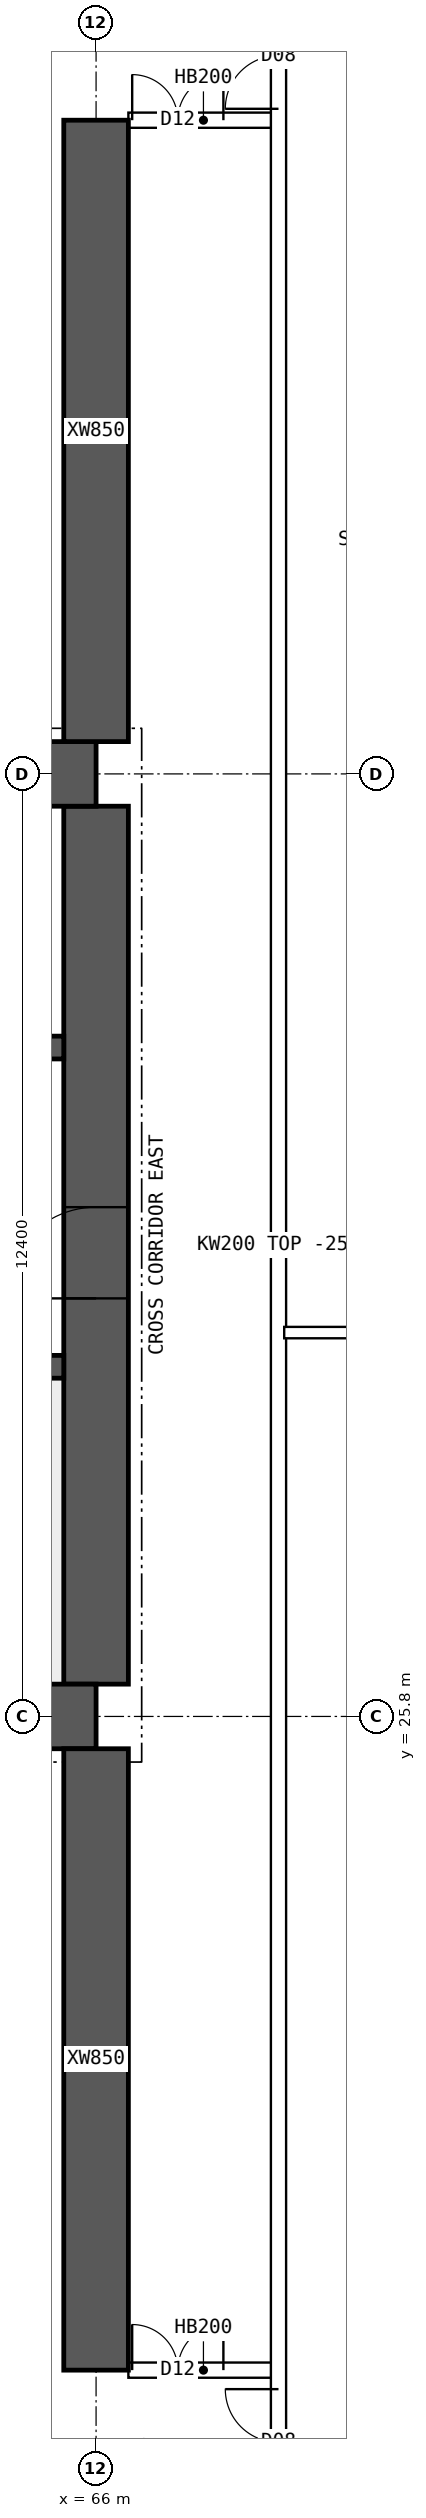
"""IFC4 building model, lengths in metres.
Left out: names, types, materials, properties, quantities, classifications, styles, units other than length and angle.
Written with IfcOpenShell. Run it as: python <this file> out.ifc"""

import sys

from ifc_helpers import new_model, si_unit, direction, frame, frame_2d, origin, place, context, subcontext, project, spatial, polyline, rectangle, outline, extrude, element, fill, save


model = new_model("IFC4")
c1 = context("Model", 3, precision=1e-05, world=origin(), true_north=direction((0.0, 1.0)))
c2 = subcontext(c1, "Body", "Model", "MODEL_VIEW")
j1 = project(units=[si_unit("LENGTHUNIT", "METRE"), si_unit("PLANEANGLEUNIT", "RADIAN")], contexts=[c1])
p1 = place(None, origin())
s1 = spatial("IfcSite", under=j1, at=p1, CompositionType="ELEMENT")
p2 = place(p1, origin())
s2 = spatial("IfcBuilding", under=s1, at=p2, CompositionType="ELEMENT")
p3 = place(p2, frame((0.0, 0.0, 182.35)))
s3 = spatial("IfcBuildingStorey", under=s2, at=p3, CompositionType="ELEMENT", Elevation=182.35)
for number, where, z_axis, x_axis in (
    (1, (18.0, 25.8, 0.0), (0.0, 0.0, 1.0), (1.0, 0.0, 0.0)),
    (2, (18.0, 38.2, 0.0), (0.0, 0.0, 1.0), (1.0, 0.0, 0.0)),
):
    element("IfcWall", number, at=place(p3, frame(where, z_axis=z_axis, x_axis=x_axis)), inside=s3, PredefinedType="SHEAR", context=c2, shape_type="SweptSolid", body=[
        extrude(rectangle(XDim=48.0, YDim=0.85, at=frame_2d((24.0, 0.0))), origin(), (0.0, 0.0, 1.0), 3.75),
    ])
p4 = place(p3, frame((66.0, 26.225, 0.0), z_axis=(0.0, 0.0, 1.0), x_axis=(0.0, 1.0, 0.0)))
e3 = element("IfcWall", 3, at=p4, inside=s3, PredefinedType="SHEAR", context=c2, shape_type="SweptSolid", body=[
    extrude(rectangle(XDim=11.55, YDim=0.85, at=frame_2d((5.775, 0.0))), origin(), (0.0, 0.0, 1.0), 3.75),
])
p5 = place(p4, frame((5.075, 0.0, 0.0)))
e4 = element("IfcOpeningElement", 4, at=p5, cuts=e3, PredefinedType="OPENING", context=c2, shape_type="SweptSolid", body=[
    extrude(rectangle(XDim=1.2, YDim=2.1, at=frame_2d((0.6, 1.05))), frame((0.0, 0.435, 0.0), z_axis=(0.0, -1.0, 0.0), x_axis=(1.0, 0.0, 0.0)), (0.0, 0.0, 1.0), 0.87),
])
p6 = place(p3, frame((18.425, 30.4, 0.0), z_axis=(0.0, 0.0, 1.0), x_axis=(1.0, 0.0, 0.0)))
e5 = element("IfcWall", 5, at=p6, inside=s3, PredefinedType="SHEAR", context=c2, shape_type="SweptSolid", body=[
    extrude(rectangle(XDim=47.15, YDim=0.3, at=frame_2d((23.575, 0.0))), origin(), (0.0, 0.0, 1.0), 3.75),
])
p7 = place(p6, frame((0.4, 0.0, 0.0)))
e6 = element("IfcOpeningElement", 6, at=p7, cuts=e5, PredefinedType="OPENING", context=c2, shape_type="SweptSolid", body=[
    extrude(rectangle(XDim=1.0, YDim=2.1, at=frame_2d((0.5, 1.05))), frame((0.0, 0.16, 0.0), z_axis=(0.0, -1.0, 0.0), x_axis=(1.0, 0.0, 0.0)), (0.0, 0.0, 1.0), 0.32),
])
p8 = place(p6, frame((45.75, 0.0, 0.0)))
e7 = element("IfcOpeningElement", 7, at=p8, cuts=e5, PredefinedType="OPENING", context=c2, shape_type="SweptSolid", body=[
    extrude(rectangle(XDim=1.0, YDim=2.1, at=frame_2d((0.5, 1.05))), frame((0.0, 0.16, 0.0), z_axis=(0.0, -1.0, 0.0), x_axis=(1.0, 0.0, 0.0)), (0.0, 0.0, 1.0), 0.32),
])
p9 = place(p6, frame((8.325, 0.0, 0.0)))
e8 = element("IfcOpeningElement", 8, at=p9, cuts=e5, PredefinedType="OPENING", context=c2, shape_type="SweptSolid", body=[
    extrude(rectangle(XDim=1.1, YDim=2.1, at=frame_2d((0.55, 1.05))), frame((0.0, 0.16, 0.0), z_axis=(0.0, -1.0, 0.0), x_axis=(1.0, 0.0, 0.0)), (0.0, 0.0, 1.0), 0.32),
])
p10 = place(p6, frame((10.925, 0.0, 0.0)))
e9 = element("IfcOpeningElement", 9, at=p10, cuts=e5, PredefinedType="OPENING", context=c2, shape_type="SweptSolid", body=[
    extrude(rectangle(XDim=1.1, YDim=2.1, at=frame_2d((0.55, 1.05))), frame((0.0, 0.16, 0.0), z_axis=(0.0, -1.0, 0.0), x_axis=(1.0, 0.0, 0.0)), (0.0, 0.0, 1.0), 0.32),
])
p11 = place(p6, frame((13.525, 0.0, 0.0)))
e10 = element("IfcOpeningElement", 10, at=p11, cuts=e5, PredefinedType="OPENING", context=c2, shape_type="SweptSolid", body=[
    extrude(rectangle(XDim=1.1, YDim=2.1, at=frame_2d((0.55, 1.05))), frame((0.0, 0.16, 0.0), z_axis=(0.0, -1.0, 0.0), x_axis=(1.0, 0.0, 0.0)), (0.0, 0.0, 1.0), 0.32),
])
p12 = place(p6, frame((16.125, 0.0, 0.0)))
e11 = element("IfcOpeningElement", 11, at=p12, cuts=e5, PredefinedType="OPENING", context=c2, shape_type="SweptSolid", body=[
    extrude(rectangle(XDim=1.1, YDim=2.1, at=frame_2d((0.55, 1.05))), frame((0.0, 0.16, 0.0), z_axis=(0.0, -1.0, 0.0), x_axis=(1.0, 0.0, 0.0)), (0.0, 0.0, 1.0), 0.32),
])
p13 = place(p6, frame((18.9, 0.0, 0.0)))
e12 = element("IfcOpeningElement", 12, at=p13, cuts=e5, PredefinedType="OPENING", context=c2, shape_type="SweptSolid", body=[
    extrude(rectangle(XDim=0.9, YDim=2.1, at=frame_2d((0.45, 1.05))), frame((0.0, 0.16, 0.0), z_axis=(0.0, -1.0, 0.0), x_axis=(1.0, 0.0, 0.0)), (0.0, 0.0, 1.0), 0.32),
])
p14 = place(p6, frame((30.192, 0.0, 0.0)))
e13 = element("IfcOpeningElement", 13, at=p14, cuts=e5, PredefinedType="OPENING", context=c2, shape_type="SweptSolid", body=[
    extrude(rectangle(XDim=1.1, YDim=2.1, at=frame_2d((0.55, 1.05))), frame((0.0, 0.16, 0.0), z_axis=(0.0, -1.0, 0.0), x_axis=(1.0, 0.0, 0.0)), (0.0, 0.0, 1.0), 0.32),
])
p15 = place(p6, frame((33.725, 0.0, 0.0)))
e14 = element("IfcOpeningElement", 14, at=p15, cuts=e5, PredefinedType="OPENING", context=c2, shape_type="SweptSolid", body=[
    extrude(rectangle(XDim=1.1, YDim=2.1, at=frame_2d((0.55, 1.05))), frame((0.0, 0.16, 0.0), z_axis=(0.0, -1.0, 0.0), x_axis=(1.0, 0.0, 0.0)), (0.0, 0.0, 1.0), 0.32),
])
p16 = place(p6, frame((37.258, 0.0, 0.0)))
e15 = element("IfcOpeningElement", 15, at=p16, cuts=e5, PredefinedType="OPENING", context=c2, shape_type="SweptSolid", body=[
    extrude(rectangle(XDim=1.1, YDim=2.1, at=frame_2d((0.55, 1.05))), frame((0.0, 0.16, 0.0), z_axis=(0.0, -1.0, 0.0), x_axis=(1.0, 0.0, 0.0)), (0.0, 0.0, 1.0), 0.32),
])
p17 = place(p3, frame((18.425, 34.6, 0.0), z_axis=(0.0, 0.0, 1.0), x_axis=(1.0, 0.0, 0.0)))
e16 = element("IfcWall", 16, at=p17, inside=s3, PredefinedType="SHEAR", context=c2, shape_type="SweptSolid", body=[
    extrude(rectangle(XDim=47.15, YDim=0.3, at=frame_2d((23.575, 0.0))), origin(), (0.0, 0.0, 1.0), 3.75),
])
p18 = place(p17, frame((0.9, 0.0, 0.0)))
e17 = element("IfcOpeningElement", 17, at=p18, cuts=e16, PredefinedType="OPENING", context=c2, shape_type="SweptSolid", body=[
    extrude(rectangle(XDim=1.1, YDim=2.1, at=frame_2d((0.55, 1.05))), frame((0.0, 0.16, 0.0), z_axis=(0.0, -1.0, 0.0), x_axis=(1.0, 0.0, 0.0)), (0.0, 0.0, 1.0), 0.32),
])
p19 = place(p17, frame((45.15, 0.0, 0.0)))
e18 = element("IfcOpeningElement", 18, at=p19, cuts=e16, PredefinedType="OPENING", context=c2, shape_type="SweptSolid", body=[
    extrude(rectangle(XDim=1.1, YDim=2.1, at=frame_2d((0.55, 1.05))), frame((0.0, 0.16, 0.0), z_axis=(0.0, -1.0, 0.0), x_axis=(1.0, 0.0, 0.0)), (0.0, 0.0, 1.0), 0.32),
])
p20 = place(p17, frame((4.175, 0.0, 0.0)))
e19 = element("IfcOpeningElement", 19, at=p20, cuts=e16, PredefinedType="OPENING", context=c2, shape_type="SweptSolid", body=[
    extrude(rectangle(XDim=0.9, YDim=2.1, at=frame_2d((0.45, 1.05))), frame((0.0, 0.16, 0.0), z_axis=(0.0, -1.0, 0.0), x_axis=(1.0, 0.0, 0.0)), (0.0, 0.0, 1.0), 0.32),
])
p21 = place(p17, frame((42.075, 0.0, 0.0)))
e20 = element("IfcOpeningElement", 20, at=p21, cuts=e16, PredefinedType="OPENING", context=c2, shape_type="SweptSolid", body=[
    extrude(rectangle(XDim=0.9, YDim=2.1, at=frame_2d((0.45, 1.05))), frame((0.0, 0.16, 0.0), z_axis=(0.0, -1.0, 0.0), x_axis=(1.0, 0.0, 0.0)), (0.0, 0.0, 1.0), 0.32),
])
p22 = place(p17, frame((8.95, 0.0, 0.0)))
e21 = element("IfcOpeningElement", 21, at=p22, cuts=e16, PredefinedType="OPENING", context=c2, shape_type="SweptSolid", body=[
    extrude(rectangle(XDim=0.9, YDim=2.1, at=frame_2d((0.45, 1.05))), frame((0.0, 0.16, 0.0), z_axis=(0.0, -1.0, 0.0), x_axis=(1.0, 0.0, 0.0)), (0.0, 0.0, 1.0), 0.32),
])
p23 = place(p17, frame((12.924, 0.0, 0.0)))
e22 = element("IfcOpeningElement", 22, at=p23, cuts=e16, PredefinedType="OPENING", context=c2, shape_type="SweptSolid", body=[
    extrude(rectangle(XDim=0.9, YDim=2.1, at=frame_2d((0.45, 1.05))), frame((0.0, 0.16, 0.0), z_axis=(0.0, -1.0, 0.0), x_axis=(1.0, 0.0, 0.0)), (0.0, 0.0, 1.0), 0.32),
])
p24 = place(p17, frame((16.571, 0.0, 0.0)))
e23 = element("IfcOpeningElement", 23, at=p24, cuts=e16, PredefinedType="OPENING", context=c2, shape_type="SweptSolid", body=[
    extrude(rectangle(XDim=0.9, YDim=2.1, at=frame_2d((0.45, 1.05))), frame((0.0, 0.16, 0.0), z_axis=(0.0, -1.0, 0.0), x_axis=(1.0, 0.0, 0.0)), (0.0, 0.0, 1.0), 0.32),
])
p25 = place(p17, frame((20.33, 0.0, 0.0)))
e24 = element("IfcOpeningElement", 24, at=p25, cuts=e16, PredefinedType="OPENING", context=c2, shape_type="SweptSolid", body=[
    extrude(rectangle(XDim=0.9, YDim=2.1, at=frame_2d((0.45, 1.05))), frame((0.0, 0.16, 0.0), z_axis=(0.0, -1.0, 0.0), x_axis=(1.0, 0.0, 0.0)), (0.0, 0.0, 1.0), 0.32),
])
p26 = place(p17, frame((24.736, 0.0, 0.0)))
e25 = element("IfcOpeningElement", 25, at=p26, cuts=e16, PredefinedType="OPENING", context=c2, shape_type="SweptSolid", body=[
    extrude(rectangle(XDim=0.9, YDim=2.1, at=frame_2d((0.45, 1.05))), frame((0.0, 0.16, 0.0), z_axis=(0.0, -1.0, 0.0), x_axis=(1.0, 0.0, 0.0)), (0.0, 0.0, 1.0), 0.32),
])
p27 = place(p17, frame((27.533, 0.0, 0.0)))
e26 = element("IfcOpeningElement", 26, at=p27, cuts=e16, PredefinedType="OPENING", context=c2, shape_type="SweptSolid", body=[
    extrude(rectangle(XDim=0.9, YDim=2.1, at=frame_2d((0.45, 1.05))), frame((0.0, 0.16, 0.0), z_axis=(0.0, -1.0, 0.0), x_axis=(1.0, 0.0, 0.0)), (0.0, 0.0, 1.0), 0.32),
])
p28 = place(p17, frame((33.654, 0.0, 0.0)))
e27 = element("IfcOpeningElement", 27, at=p28, cuts=e16, PredefinedType="OPENING", context=c2, shape_type="SweptSolid", body=[
    extrude(rectangle(XDim=0.9, YDim=2.1, at=frame_2d((0.45, 1.05))), frame((0.0, 0.16, 0.0), z_axis=(0.0, -1.0, 0.0), x_axis=(1.0, 0.0, 0.0)), (0.0, 0.0, 1.0), 0.32),
])
for number, where, z_axis, x_axis in (
    (28, (66.0, 17.2, 0.0), (0.0, 0.0, 1.0), (0.0, 1.0, 0.0)),
    (29, (66.0, 38.625, 0.0), (0.0, 0.0, 1.0), (0.0, 1.0, 0.0)),
):
    element("IfcWall", number, at=place(p3, frame(where, z_axis=z_axis, x_axis=x_axis)), inside=s3, PredefinedType="SHEAR", context=c2, shape_type="SweptSolid", body=[
        extrude(rectangle(XDim=8.175, YDim=0.85, at=frame_2d((4.087, 0.0))), origin(), (0.0, 0.0, 1.0), 3.75),
    ])
p29 = place(p3, frame((66.425, 17.2, 0.0), z_axis=(0.0, 0.0, 1.0), x_axis=(1.0, 0.0, 0.0)))
e30 = element("IfcWall", 30, at=p29, inside=s3, PredefinedType="SOLIDWALL", context=c2, shape_type="SweptSolid", body=[
    extrude(rectangle(XDim=1.975, YDim=0.2, at=frame_2d((0.987, 0.0))), origin(), (0.0, 0.0, 1.0), 3.5),
])
p30 = place(p29, frame((0.05, 0.0, 0.0)))
e31 = element("IfcOpeningElement", 31, at=p30, cuts=e30, PredefinedType="OPENING", context=c2, shape_type="SweptSolid", body=[
    extrude(rectangle(XDim=1.2, YDim=2.1, at=frame_2d((0.6, 1.05))), frame((0.0, 0.11, 0.0), z_axis=(0.0, -1.0, 0.0), x_axis=(1.0, 0.0, 0.0)), (0.0, 0.0, 1.0), 0.22),
])
p31 = place(p3, frame((66.425, 46.8, 0.0), z_axis=(0.0, 0.0, 1.0), x_axis=(1.0, 0.0, 0.0)))
e32 = element("IfcWall", 32, at=p31, inside=s3, PredefinedType="SOLIDWALL", context=c2, shape_type="SweptSolid", body=[
    extrude(rectangle(XDim=1.975, YDim=0.2, at=frame_2d((0.987, 0.0))), origin(), (0.0, 0.0, 1.0), 3.5),
])
p32 = place(p31, frame((0.05, 0.0, 0.0)))
e33 = element("IfcOpeningElement", 33, at=p32, cuts=e32, PredefinedType="OPENING", context=c2, shape_type="SweptSolid", body=[
    extrude(rectangle(XDim=1.2, YDim=2.1, at=frame_2d((0.6, 1.05))), frame((0.0, 0.11, 0.0), z_axis=(0.0, -1.0, 0.0), x_axis=(1.0, 0.0, 0.0)), (0.0, 0.0, 1.0), 0.22),
])
p33 = place(p3, frame((68.475, 30.85, 0.0), z_axis=(0.0, 0.0, 1.0), x_axis=(1.0, 0.0, 0.0)))
e34 = element("IfcWall", 34, at=p33, inside=s3, PredefinedType="PARTITIONING", context=c2, shape_type="SweptSolid", body=[
    extrude(outline(polyline([(0.0, 0.0), (6.82, 0.0), (6.82, 3.5), (3.827, 3.5), (3.825, 3.05), (3.227, 3.05), (3.225, 3.5), (0.0, 3.5), (0.0, 0.0)])), frame((0.0, 0.075, 0.0), z_axis=(0.0, -1.0, 0.0), x_axis=(1.0, 0.0, 0.0)), (0.0, 0.0, 1.0), 0.15),
])
p34 = place(p3, frame((68.4, 10.446, 0.0), z_axis=(0.0, 0.0, 1.0), x_axis=(0.0, 1.0, 0.0)))
e35 = element("IfcWall", 35, at=p34, inside=s3, PredefinedType="SOLIDWALL", context=c2, shape_type="SweptSolid", body=[
    extrude(rectangle(XDim=43.107, YDim=0.2, at=frame_2d((21.554, 0.0))), origin(), (0.0, 0.0, 1.0), 3.5),
])
p35 = place(p34, frame((5.104, 0.0, 0.0)))
e36 = element("IfcOpeningElement", 36, at=p35, cuts=e35, PredefinedType="OPENING", context=c2, shape_type="SweptSolid", body=[
    extrude(rectangle(XDim=1.4, YDim=2.1, at=frame_2d((0.7, 1.05))), frame((0.0, 0.11, 0.0), z_axis=(0.0, -1.0, 0.0), x_axis=(1.0, 0.0, 0.0)), (0.0, 0.0, 1.0), 0.22),
])
p36 = place(p34, frame((36.504, 0.0, 0.0)))
e37 = element("IfcOpeningElement", 37, at=p36, cuts=e35, PredefinedType="OPENING", context=c2, shape_type="SweptSolid", body=[
    extrude(rectangle(XDim=1.4, YDim=2.1, at=frame_2d((0.7, 1.05))), frame((0.0, 0.11, 0.0), z_axis=(0.0, -1.0, 0.0), x_axis=(1.0, 0.0, 0.0)), (0.0, 0.0, 1.0), 0.22),
])
p37 = place(p5, origin())
e38 = element("IfcDoor", 38, at=p37, inside=s3, OperationType="SINGLE_SWING_LEFT", PredefinedType="DOOR", context=c2, shape_type="SweptSolid", body=[
    extrude(rectangle(XDim=1.2, YDim=2.1, at=frame_2d((0.6, 1.05))), frame((0.0, 0.025, 0.0), z_axis=(0.0, -1.0, 0.0), x_axis=(1.0, 0.0, 0.0)), (0.0, 0.0, 1.0), 0.05),
])
fill(e4, e38)
p38 = place(p30, origin())
e39 = element("IfcDoor", 39, at=p38, inside=s3, OperationType="DOUBLE_DOOR_SINGLE_SWING", PredefinedType="DOOR", context=c2, shape_type="SweptSolid", body=[
    extrude(rectangle(XDim=1.2, YDim=2.1, at=frame_2d((0.6, 1.05))), frame((0.0, 0.025, 0.0), z_axis=(0.0, -1.0, 0.0), x_axis=(1.0, 0.0, 0.0)), (0.0, 0.0, 1.0), 0.05),
])
fill(e31, e39)
p39 = place(p32, origin())
e40 = element("IfcDoor", 40, at=p39, inside=s3, OperationType="DOUBLE_DOOR_SINGLE_SWING", PredefinedType="DOOR", context=c2, shape_type="SweptSolid", body=[
    extrude(rectangle(XDim=1.2, YDim=2.1, at=frame_2d((0.6, 1.05))), frame((0.0, 0.025, 0.0), z_axis=(0.0, -1.0, 0.0), x_axis=(1.0, 0.0, 0.0)), (0.0, 0.0, 1.0), 0.05),
])
fill(e33, e40)
p40 = place(p35, origin())
e41 = element("IfcDoor", 41, at=p40, inside=s3, OperationType="DOUBLE_DOOR_SINGLE_SWING", PredefinedType="DOOR", context=c2, shape_type="SweptSolid", body=[
    extrude(rectangle(XDim=1.4, YDim=2.1, at=frame_2d((0.7, 1.05))), frame((0.0, 0.025, 0.0), z_axis=(0.0, -1.0, 0.0), x_axis=(1.0, 0.0, 0.0)), (0.0, 0.0, 1.0), 0.05),
])
fill(e36, e41)
p41 = place(p36, origin())
e42 = element("IfcDoor", 42, at=p41, inside=s3, OperationType="DOUBLE_DOOR_SINGLE_SWING", PredefinedType="DOOR", context=c2, shape_type="SweptSolid", body=[
    extrude(rectangle(XDim=1.4, YDim=2.1, at=frame_2d((0.7, 1.05))), frame((0.0, 0.025, 0.0), z_axis=(0.0, -1.0, 0.0), x_axis=(1.0, 0.0, 0.0)), (0.0, 0.0, 1.0), 0.05),
])
fill(e37, e42)
save(model, sys.argv[1])
